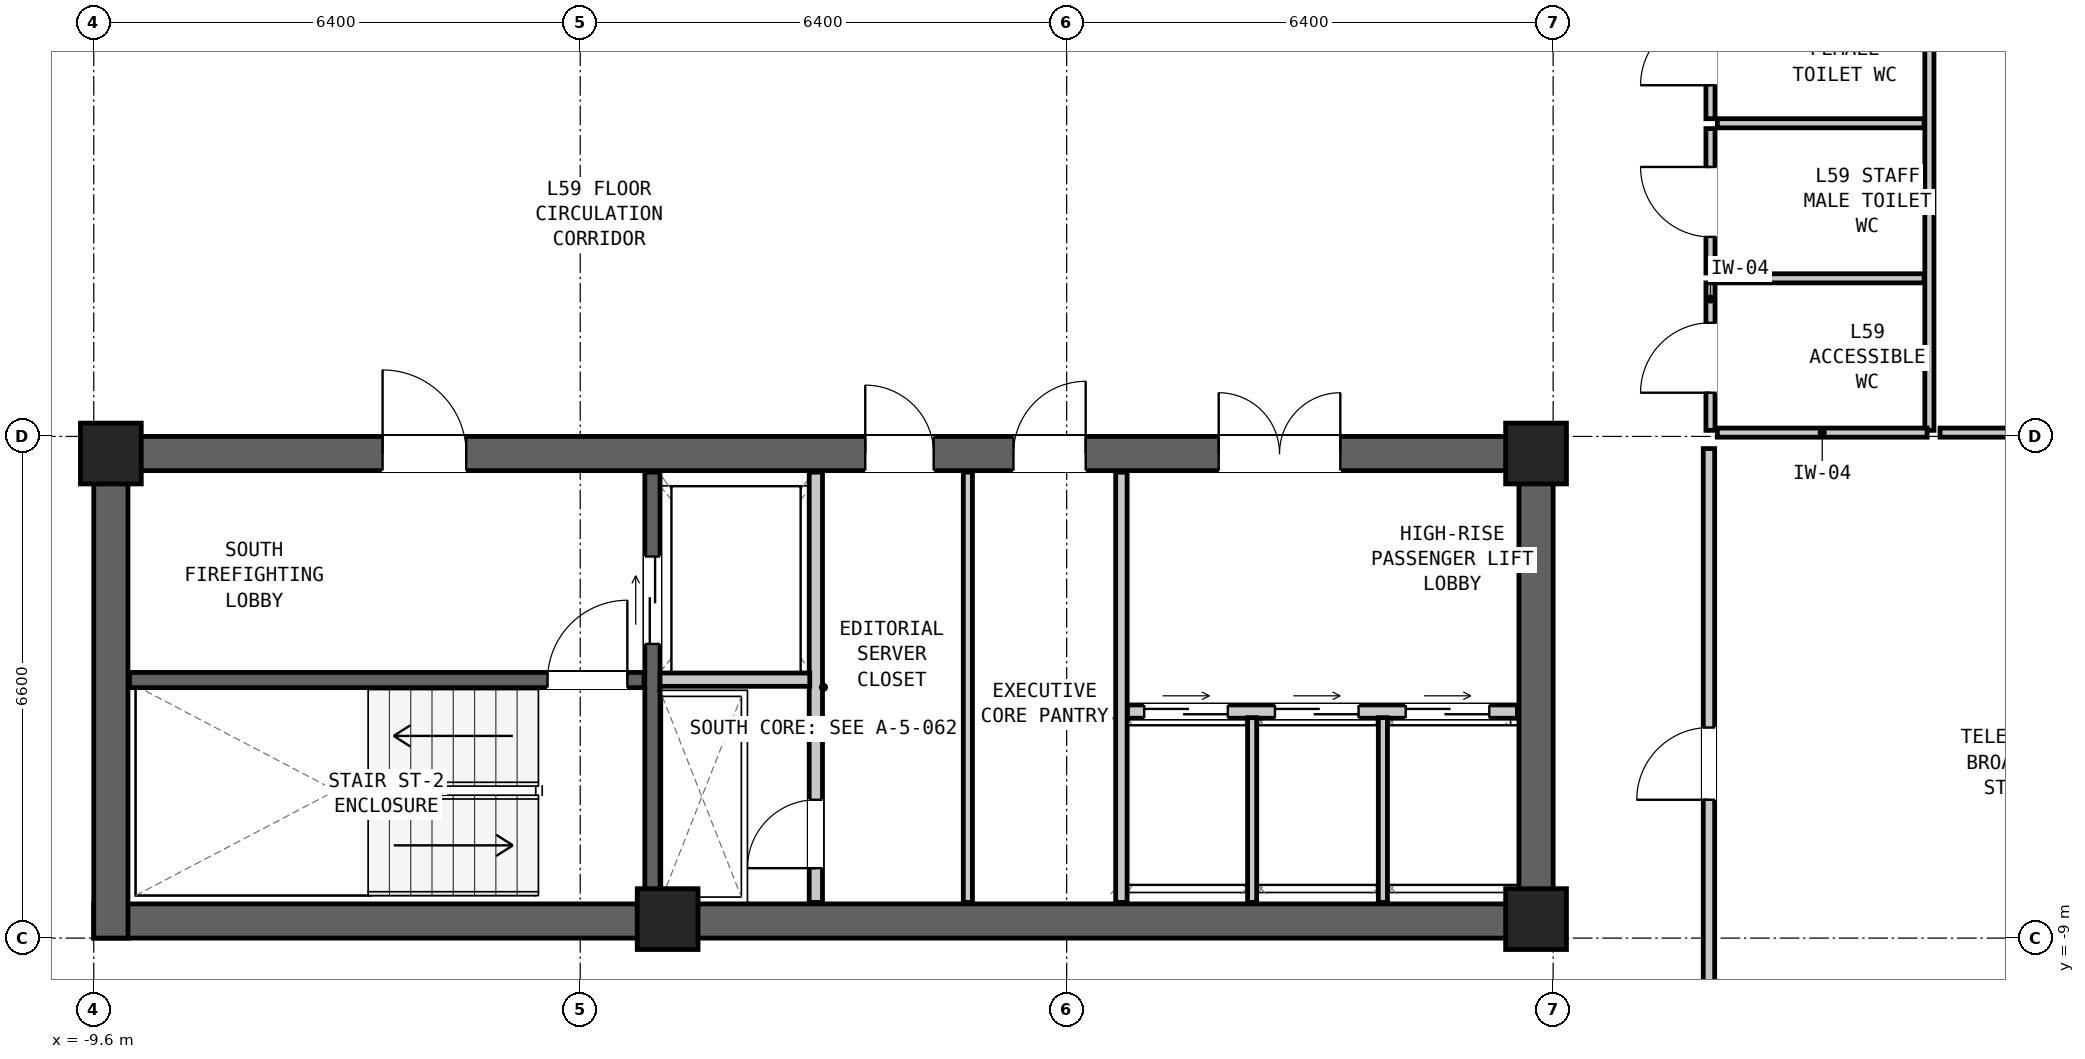
"""IFC4 building model, lengths in metres.
Left out: names, types, materials, properties, quantities, classifications, styles, units other than length and angle.
Written with IfcOpenShell. Run it as: python <this file> out.ifc"""

import sys

from ifc_helpers import new_model, si_unit, direction, frame, frame_2d, origin, origin_2d, place, context, subcontext, project, spatial, rectangle, extrude, element, fill, save


model = new_model("IFC4")
c1 = context("Model", 3, precision=1e-05, world=origin(), true_north=direction((0.0, 1.0)))
c2 = subcontext(c1, "Body", "Model", "MODEL_VIEW")
j1 = project(units=[si_unit("LENGTHUNIT", "METRE"), si_unit("PLANEANGLEUNIT", "RADIAN")], contexts=[c1])
p1 = place(None, origin())
s1 = spatial("IfcSite", under=j1, at=p1, CompositionType="ELEMENT")
p2 = place(p1, origin())
s2 = spatial("IfcBuilding", under=s1, at=p2, CompositionType="ELEMENT")
p3 = place(p2, frame((0.0, 0.0, 202.55)))
s3 = spatial("IfcBuildingStorey", under=s2, at=p3, CompositionType="ELEMENT", Elevation=202.55)
p4 = place(p3, frame((-9.6, -8.775, 0.0), z_axis=(0.0, 0.0, 1.0), x_axis=(1.0, 0.0, 0.0)))
e1 = element("IfcWall", 1, at=p4, inside=s3, PredefinedType="SHEAR", context=c2, shape_type="SweptSolid", body=[
    extrude(rectangle(XDim=19.2, YDim=0.45, at=frame_2d((9.6, 0.0))), origin(), (0.0, 0.0, 1.0), 3.05),
])
p5 = place(p3, frame((-9.6, -2.625, 0.0), z_axis=(0.0, 0.0, 1.0), x_axis=(1.0, 0.0, 0.0)))
e2 = element("IfcWall", 2, at=p5, inside=s3, PredefinedType="SHEAR", context=c2, shape_type="SweptSolid", body=[
    extrude(rectangle(XDim=19.2, YDim=0.45, at=frame_2d((9.6, 0.0))), origin(), (0.0, 0.0, 1.0), 3.05),
])
p6 = place(p5, frame((3.8, 0.0, 0.0)))
e3 = element("IfcOpeningElement", 3, at=p6, cuts=e2, PredefinedType="OPENING", context=c2, shape_type="SweptSolid", body=[
    extrude(rectangle(XDim=1.1, YDim=2.08, at=frame_2d((0.55, 1.04))), frame((0.0, 0.237, 0.0), z_axis=(0.0, -1.0, 0.0), x_axis=(1.0, 0.0, 0.0)), (0.0, 0.0, 1.0), 0.474),
])
p7 = place(p5, frame((10.15, 0.0, 0.0)))
e4 = element("IfcOpeningElement", 4, at=p7, cuts=e2, PredefinedType="OPENING", context=c2, shape_type="SweptSolid", body=[
    extrude(rectangle(XDim=0.9, YDim=2.05, at=frame_2d((0.45, 1.025))), frame((0.0, 0.237, 0.0), z_axis=(0.0, -1.0, 0.0), x_axis=(1.0, 0.0, 0.0)), (0.0, 0.0, 1.0), 0.474),
])
p8 = place(p5, frame((12.1, 0.0, 0.0)))
e5 = element("IfcOpeningElement", 5, at=p8, cuts=e2, PredefinedType="OPENING", context=c2, shape_type="SweptSolid", body=[
    extrude(rectangle(XDim=0.95, YDim=2.1, at=frame_2d((0.475, 1.05))), frame((0.0, 0.237, 0.0), z_axis=(0.0, -1.0, 0.0), x_axis=(1.0, 0.0, 0.0)), (0.0, 0.0, 1.0), 0.474),
])
p9 = place(p5, frame((14.8, 0.0, 0.0)))
e6 = element("IfcOpeningElement", 6, at=p9, cuts=e2, PredefinedType="OPENING", context=c2, shape_type="SweptSolid", body=[
    extrude(rectangle(XDim=1.6, YDim=2.12, at=frame_2d((0.8, 1.06))), frame((0.0, 0.237, 0.0), z_axis=(0.0, -1.0, 0.0), x_axis=(1.0, 0.0, 0.0)), (0.0, 0.0, 1.0), 0.474),
])
for number, where, z_axis, x_axis in (
    (7, (-9.375, -9.0, 0.0), (0.0, 0.0, 1.0), (0.0, 1.0, 0.0)),
    (8, (9.375, -9.0, 0.0), (0.0, 0.0, 1.0), (0.0, 1.0, 0.0)),
):
    element("IfcWall", number, at=place(p3, frame(where, z_axis=z_axis, x_axis=x_axis)), inside=s3, PredefinedType="SHEAR", context=c2, shape_type="SweptSolid", body=[
        extrude(rectangle(XDim=6.6, YDim=0.45, at=frame_2d((3.3, 0.0))), origin(), (0.0, 0.0, 1.0), 3.05),
    ])
for number, where, z_axis, x_axis in (
    (9, (-9.375, -2.625, 0.0), (0.0, 0.0, 1.0), (1.0, 0.0, 0.0)),
    (10, (9.375, -2.625, 0.0), (0.0, 0.0, 1.0), (1.0, 0.0, 0.0)),
    (11, (-2.05, -8.75, 0.0), (0.0, 0.0, 1.0), (1.0, 0.0, 0.0)),
    (12, (9.375, -8.75, 0.0), (0.0, 0.0, 1.0), (1.0, 0.0, 0.0)),
):
    element("IfcColumn", number, at=place(p3, frame(where, z_axis=z_axis, x_axis=x_axis)), inside=s3, PredefinedType="COLUMN", context=c2, shape_type="SweptSolid", body=[
        extrude(rectangle(XDim=0.8, YDim=0.8, at=origin_2d()), origin(), (0.0, 0.0, 1.0), 3.05),
    ])
p10 = place(p3, frame((-9.13, -5.605, 0.0), z_axis=(0.0, 0.0, 1.0), x_axis=(1.0, 0.0, 0.0)))
e13 = element("IfcWall", 13, at=p10, inside=s3, PredefinedType="SHEAR", context=c2, shape_type="SweptSolid", body=[
    extrude(rectangle(XDim=6.77, YDim=0.2, at=frame_2d((3.385, 0.0))), origin(), (0.0, 0.0, 1.0), 2.86),
])
p11 = place(p10, frame((5.5, 0.0, 0.0)))
e14 = element("IfcOpeningElement", 14, at=p11, cuts=e13, PredefinedType="OPENING", context=c2, shape_type="SweptSolid", body=[
    extrude(rectangle(XDim=1.05, YDim=2.08, at=frame_2d((0.525, 1.04))), frame((0.0, 0.112, 0.0), z_axis=(0.0, -1.0, 0.0), x_axis=(1.0, 0.0, 0.0)), (0.0, 0.0, 1.0), 0.224),
])
p12 = place(p3, frame((-2.25, -8.53, 0.0), z_axis=(0.0, 0.0, 1.0), x_axis=(0.0, 1.0, 0.0)))
e15 = element("IfcWall", 15, at=p12, inside=s3, PredefinedType="SHEAR", context=c2, shape_type="SweptSolid", body=[
    extrude(rectangle(XDim=5.66, YDim=0.2, at=frame_2d((2.83, 0.0))), origin(), (0.0, 0.0, 1.0), 2.86),
])
p13 = place(p12, frame((3.4, 0.0, 0.0)))
e16 = element("IfcOpeningElement", 16, at=p13, cuts=e15, PredefinedType="OPENING", context=c2, shape_type="SweptSolid", body=[
    extrude(rectangle(XDim=1.15, YDim=2.08, at=frame_2d((0.575, 1.04))), frame((0.0, 0.112, 0.0), z_axis=(0.0, -1.0, 0.0), x_axis=(1.0, 0.0, 0.0)), (0.0, 0.0, 1.0), 0.224),
])
p14 = place(p3, frame((-0.1, -8.53, 0.0), z_axis=(0.0, 0.0, 1.0), x_axis=(0.0, 1.0, 0.0)))
e17 = element("IfcWall", 17, at=p14, inside=s3, PredefinedType="PARTITIONING", context=c2, shape_type="SweptSolid", body=[
    extrude(rectangle(XDim=5.66, YDim=0.175, at=frame_2d((2.83, 0.0))), origin(), (0.0, 0.0, 1.0), 2.86),
])
p15 = place(p14, frame((0.45, 0.0, 0.0)))
e18 = element("IfcOpeningElement", 18, at=p15, cuts=e17, PredefinedType="OPENING", context=c2, shape_type="SweptSolid", body=[
    extrude(rectangle(XDim=0.9, YDim=2.05, at=frame_2d((0.45, 1.025))), frame((0.0, 0.1, 0.0), z_axis=(0.0, -1.0, 0.0), x_axis=(1.0, 0.0, 0.0)), (0.0, 0.0, 1.0), 0.199),
])
p16 = place(p3, frame((-2.15, -5.6, 0.0), z_axis=(0.0, 0.0, 1.0), x_axis=(1.0, 0.0, 0.0)))
e19 = element("IfcWall", 19, at=p16, inside=s3, PredefinedType="PARTITIONING", context=c2, shape_type="SweptSolid", body=[
    extrude(rectangle(XDim=1.97, YDim=0.175, at=frame_2d((0.985, 0.0))), origin(), (0.0, 0.0, 1.0), 2.86),
])
p17 = place(p3, frame((3.92, -8.53, 0.0), z_axis=(0.0, 0.0, 1.0), x_axis=(0.0, 1.0, 0.0)))
e20 = element("IfcWall", 20, at=p17, inside=s3, PredefinedType="PARTITIONING", context=c2, shape_type="SweptSolid", body=[
    extrude(rectangle(XDim=5.66, YDim=0.15, at=frame_2d((2.83, 0.0))), origin(), (0.0, 0.0, 1.0), 2.86),
])
p18 = place(p3, frame((1.9, -8.53, 0.0), z_axis=(0.0, 0.0, 1.0), x_axis=(0.0, 1.0, 0.0)))
e21 = element("IfcWall", 21, at=p18, inside=s3, PredefinedType="PARTITIONING", context=c2, shape_type="SweptSolid", body=[
    extrude(rectangle(XDim=5.66, YDim=0.12, at=frame_2d((2.83, 0.0))), origin(), (0.0, 0.0, 1.0), 2.86),
])
p19 = place(p3, frame((4.0, -6.02, 0.0), z_axis=(0.0, 0.0, 1.0), x_axis=(1.0, 0.0, 0.0)))
e22 = element("IfcWall", 22, at=p19, inside=s3, PredefinedType="PARTITIONING", context=c2, shape_type="SweptSolid", body=[
    extrude(rectangle(XDim=5.13, YDim=0.175, at=frame_2d((2.565, 0.0))), origin(), (0.0, 0.0, 1.0), 2.86),
])
p20 = place(p19, frame((0.22, 0.0, 0.0)))
e23 = element("IfcOpeningElement", 23, at=p20, cuts=e22, PredefinedType="OPENING", context=c2, shape_type="SweptSolid", body=[
    extrude(rectangle(XDim=1.1, YDim=2.06, at=frame_2d((0.55, 1.03))), frame((0.0, 0.1, 0.0), z_axis=(0.0, -1.0, 0.0), x_axis=(1.0, 0.0, 0.0)), (0.0, 0.0, 1.0), 0.199),
])
p21 = place(p19, frame((1.94, 0.0, 0.0)))
e24 = element("IfcOpeningElement", 24, at=p21, cuts=e22, PredefinedType="OPENING", context=c2, shape_type="SweptSolid", body=[
    extrude(rectangle(XDim=1.1, YDim=2.06, at=frame_2d((0.55, 1.03))), frame((0.0, 0.1, 0.0), z_axis=(0.0, -1.0, 0.0), x_axis=(1.0, 0.0, 0.0)), (0.0, 0.0, 1.0), 0.199),
])
p22 = place(p19, frame((3.66, 0.0, 0.0)))
e25 = element("IfcOpeningElement", 25, at=p22, cuts=e22, PredefinedType="OPENING", context=c2, shape_type="SweptSolid", body=[
    extrude(rectangle(XDim=1.1, YDim=2.06, at=frame_2d((0.55, 1.03))), frame((0.0, 0.1, 0.0), z_axis=(0.0, -1.0, 0.0), x_axis=(1.0, 0.0, 0.0)), (0.0, 0.0, 1.0), 0.199),
])
for number, where, z_axis, x_axis in (
    (26, (5.64, -8.53, 0.0), (0.0, 0.0, 1.0), (0.0, 1.0, 0.0)),
    (27, (7.36, -8.53, 0.0), (0.0, 0.0, 1.0), (0.0, 1.0, 0.0)),
):
    element("IfcWall", number, at=place(p3, frame(where, z_axis=z_axis, x_axis=x_axis)), inside=s3, PredefinedType="PARTITIONING", context=c2, shape_type="SweptSolid", body=[
        extrude(rectangle(XDim=2.43, YDim=0.12, at=frame_2d((1.215, 0.0))), origin(), (0.0, 0.0, 1.0), 2.86),
    ])
p23 = place(p3, frame((11.67, -2.32, 0.0), z_axis=(0.0, 0.0, 1.0), x_axis=(0.0, 1.0, 0.0)))
e28 = element("IfcWall", 28, at=p23, inside=s3, PredefinedType="PARTITIONING", context=c2, shape_type="SweptSolid", body=[
    extrude(rectangle(XDim=1.94, YDim=0.12, at=frame_2d((0.97, 0.0))), origin(), (0.0, 0.0, 1.0), 2.86),
])
p24 = place(p23, frame((0.495, 0.0, 0.0)))
e29 = element("IfcOpeningElement", 29, at=p24, cuts=e28, PredefinedType="OPENING", context=c2, shape_type="SweptSolid", body=[
    extrude(rectangle(XDim=0.92, YDim=2.1, at=frame_2d((0.46, 1.05))), frame((0.0, 0.072, 0.0), z_axis=(0.0, -1.0, 0.0), x_axis=(1.0, 0.0, 0.0)), (0.0, 0.0, 1.0), 0.144),
])
p25 = place(p3, frame((11.67, -0.25, 0.0), z_axis=(0.0, 0.0, 1.0), x_axis=(0.0, 1.0, 0.0)))
e30 = element("IfcWall", 30, at=p25, inside=s3, PredefinedType="PARTITIONING", context=c2, shape_type="SweptSolid", body=[
    extrude(rectangle(XDim=1.9, YDim=0.12, at=frame_2d((0.95, 0.0))), origin(), (0.0, 0.0, 1.0), 2.86),
])
p26 = place(p25, frame((0.475, 0.0, 0.0)))
e31 = element("IfcOpeningElement", 31, at=p26, cuts=e30, PredefinedType="OPENING", context=c2, shape_type="SweptSolid", body=[
    extrude(rectangle(XDim=0.92, YDim=2.1, at=frame_2d((0.46, 1.05))), frame((0.0, 0.072, 0.0), z_axis=(0.0, -1.0, 0.0), x_axis=(1.0, 0.0, 0.0)), (0.0, 0.0, 1.0), 0.144),
])
p27 = place(p3, frame((11.67, 1.78, 0.0), z_axis=(0.0, 0.0, 1.0), x_axis=(0.0, 1.0, 0.0)))
e32 = element("IfcWall", 32, at=p27, inside=s3, PredefinedType="PARTITIONING", context=c2, shape_type="SweptSolid", body=[
    extrude(rectangle(XDim=1.83, YDim=0.12, at=frame_2d((0.915, 0.0))), origin(), (0.0, 0.0, 1.0), 2.86),
])
p28 = place(p27, frame((0.44, 0.0, 0.0)))
e33 = element("IfcOpeningElement", 33, at=p28, cuts=e32, PredefinedType="OPENING", context=c2, shape_type="SweptSolid", body=[
    extrude(rectangle(XDim=0.92, YDim=2.1, at=frame_2d((0.46, 1.05))), frame((0.0, 0.072, 0.0), z_axis=(0.0, -1.0, 0.0), x_axis=(1.0, 0.0, 0.0)), (0.0, 0.0, 1.0), 0.144),
])
p29 = place(p3, frame((14.55, -2.32, 0.0), z_axis=(0.0, 0.0, 1.0), x_axis=(0.0, 1.0, 0.0)))
e34 = element("IfcWall", 34, at=p29, inside=s3, PredefinedType="PARTITIONING", context=c2, shape_type="SweptSolid", body=[
    extrude(rectangle(XDim=5.93, YDim=0.12, at=frame_2d((2.965, 0.0))), origin(), (0.0, 0.0, 1.0), 2.86),
])
p30 = place(p3, frame((11.76, -2.35, 0.0), z_axis=(0.0, 0.0, 1.0), x_axis=(1.0, 0.0, 0.0)))
e35 = element("IfcWall", 35, at=p30, inside=s3, PredefinedType="PARTITIONING", context=c2, shape_type="SweptSolid", body=[
    extrude(rectangle(XDim=2.76, YDim=0.12, at=frame_2d((1.38, 0.0))), origin(), (0.0, 0.0, 1.0), 1.981),
])
for number, where, z_axis, x_axis in (
    (36, (11.76, -0.32, 0.0), (0.0, 0.0, 1.0), (1.0, 0.0, 0.0)),
    (37, (11.76, 1.72, 0.0), (0.0, 0.0, 1.0), (1.0, 0.0, 0.0)),
):
    element("IfcWall", number, at=place(p3, frame(where, z_axis=z_axis, x_axis=x_axis)), inside=s3, PredefinedType="PARTITIONING", context=c2, shape_type="SweptSolid", body=[
        extrude(rectangle(XDim=2.72, YDim=0.12, at=frame_2d((1.36, 0.0))), origin(), (0.0, 0.0, 1.0), 2.86),
    ])
p31 = place(p3, frame((14.69, -2.35, 0.0), z_axis=(0.0, 0.0, 1.0), x_axis=(1.0, 0.0, 0.0)))
e38 = element("IfcWall", 38, at=p31, inside=s3, PredefinedType="PARTITIONING", context=c2, shape_type="SweptSolid", body=[
    extrude(rectangle(XDim=4.69, YDim=0.12, at=frame_2d((2.345, 0.0))), origin(), (0.0, 0.0, 1.0), 1.981),
])
p32 = place(p3, frame((11.65, -10.85, 0.0), z_axis=(0.0, 0.0, 1.0), x_axis=(0.0, 1.0, 0.0)))
e39 = element("IfcWall", 39, at=p32, inside=s3, PredefinedType="PARTITIONING", context=c2, shape_type="SweptSolid", body=[
    extrude(rectangle(XDim=8.29, YDim=0.15, at=frame_2d((4.145, 0.0))), origin(), (0.0, 0.0, 1.0), 2.86),
])
p33 = place(p32, frame((3.67, 0.0, 0.0)))
e40 = element("IfcOpeningElement", 40, at=p33, cuts=e39, PredefinedType="OPENING", context=c2, shape_type="SweptSolid", body=[
    extrude(rectangle(XDim=0.95, YDim=2.1, at=frame_2d((0.475, 1.05))), frame((0.0, 0.087, 0.0), z_axis=(0.0, -1.0, 0.0), x_axis=(1.0, 0.0, 0.0)), (0.0, 0.0, 1.0), 0.174),
])
p34 = place(p11, origin())
e41 = element("IfcDoor", 41, at=p34, inside=s3, OperationType="SINGLE_SWING_RIGHT", PredefinedType="DOOR", context=c2, shape_type="SweptSolid", body=[
    extrude(rectangle(XDim=1.05, YDim=2.08, at=frame_2d((0.525, 1.04))), frame((0.0, 0.025, 0.0), z_axis=(0.0, -1.0, 0.0), x_axis=(1.0, 0.0, 0.0)), (0.0, 0.0, 1.0), 0.05),
])
fill(e14, e41)
p35 = place(p6, origin())
e42 = element("IfcDoor", 42, at=p35, inside=s3, OperationType="SINGLE_SWING_LEFT", PredefinedType="DOOR", context=c2, shape_type="SweptSolid", body=[
    extrude(rectangle(XDim=1.1, YDim=2.08, at=frame_2d((0.55, 1.04))), frame((0.0, 0.025, 0.0), z_axis=(0.0, -1.0, 0.0), x_axis=(1.0, 0.0, 0.0)), (0.0, 0.0, 1.0), 0.05),
])
fill(e3, e42)
p36 = place(p13, origin())
e43 = element("IfcDoor", 43, at=p36, inside=s3, OperationType="DOUBLE_DOOR_SLIDING", PredefinedType="DOOR", context=c2, shape_type="SweptSolid", body=[
    extrude(rectangle(XDim=1.15, YDim=2.08, at=frame_2d((0.575, 1.04))), frame((0.0, 0.025, 0.0), z_axis=(0.0, -1.0, 0.0), x_axis=(1.0, 0.0, 0.0)), (0.0, 0.0, 1.0), 0.05),
])
fill(e16, e43)
p37 = place(p15, origin())
e44 = element("IfcDoor", 44, at=p37, inside=s3, OperationType="SINGLE_SWING_LEFT", PredefinedType="DOOR", context=c2, shape_type="SweptSolid", body=[
    extrude(rectangle(XDim=0.9, YDim=2.05, at=frame_2d((0.45, 1.025))), frame((0.0, 0.025, 0.0), z_axis=(0.0, -1.0, 0.0), x_axis=(1.0, 0.0, 0.0)), (0.0, 0.0, 1.0), 0.05),
])
fill(e18, e44)
p38 = place(p7, origin())
e45 = element("IfcDoor", 45, at=p38, inside=s3, OperationType="SINGLE_SWING_LEFT", PredefinedType="DOOR", context=c2, shape_type="SweptSolid", body=[
    extrude(rectangle(XDim=0.9, YDim=2.05, at=frame_2d((0.45, 1.025))), frame((0.0, 0.025, 0.0), z_axis=(0.0, -1.0, 0.0), x_axis=(1.0, 0.0, 0.0)), (0.0, 0.0, 1.0), 0.05),
])
fill(e4, e45)
p39 = place(p8, origin())
e46 = element("IfcDoor", 46, at=p39, inside=s3, OperationType="SINGLE_SWING_RIGHT", PredefinedType="DOOR", context=c2, shape_type="SweptSolid", body=[
    extrude(rectangle(XDim=0.95, YDim=2.1, at=frame_2d((0.475, 1.05))), frame((0.0, 0.025, 0.0), z_axis=(0.0, -1.0, 0.0), x_axis=(1.0, 0.0, 0.0)), (0.0, 0.0, 1.0), 0.05),
])
fill(e5, e46)
p40 = place(p20, origin())
e47 = element("IfcDoor", 47, at=p40, inside=s3, OperationType="DOUBLE_DOOR_SLIDING", PredefinedType="DOOR", context=c2, shape_type="SweptSolid", body=[
    extrude(rectangle(XDim=1.1, YDim=2.06, at=frame_2d((0.55, 1.03))), frame((0.0, 0.025, 0.0), z_axis=(0.0, -1.0, 0.0), x_axis=(1.0, 0.0, 0.0)), (0.0, 0.0, 1.0), 0.05),
])
fill(e23, e47)
p41 = place(p21, origin())
e48 = element("IfcDoor", 48, at=p41, inside=s3, OperationType="DOUBLE_DOOR_SLIDING", PredefinedType="DOOR", context=c2, shape_type="SweptSolid", body=[
    extrude(rectangle(XDim=1.1, YDim=2.06, at=frame_2d((0.55, 1.03))), frame((0.0, 0.025, 0.0), z_axis=(0.0, -1.0, 0.0), x_axis=(1.0, 0.0, 0.0)), (0.0, 0.0, 1.0), 0.05),
])
fill(e24, e48)
p42 = place(p22, origin())
e49 = element("IfcDoor", 49, at=p42, inside=s3, OperationType="DOUBLE_DOOR_SLIDING", PredefinedType="DOOR", context=c2, shape_type="SweptSolid", body=[
    extrude(rectangle(XDim=1.1, YDim=2.06, at=frame_2d((0.55, 1.03))), frame((0.0, 0.025, 0.0), z_axis=(0.0, -1.0, 0.0), x_axis=(1.0, 0.0, 0.0)), (0.0, 0.0, 1.0), 0.05),
])
fill(e25, e49)
p43 = place(p9, origin())
e50 = element("IfcDoor", 50, at=p43, inside=s3, OperationType="DOUBLE_DOOR_SINGLE_SWING", PredefinedType="DOOR", context=c2, shape_type="SweptSolid", body=[
    extrude(rectangle(XDim=1.6, YDim=2.12, at=frame_2d((0.8, 1.06))), frame((0.0, 0.025, 0.0), z_axis=(0.0, -1.0, 0.0), x_axis=(1.0, 0.0, 0.0)), (0.0, 0.0, 1.0), 0.05),
])
fill(e6, e50)
p44 = place(p24, origin())
e51 = element("IfcDoor", 51, at=p44, inside=s3, OperationType="SINGLE_SWING_LEFT", PredefinedType="DOOR", context=c2, shape_type="SweptSolid", body=[
    extrude(rectangle(XDim=0.92, YDim=2.1, at=frame_2d((0.46, 1.05))), frame((0.0, 0.025, 0.0), z_axis=(0.0, -1.0, 0.0), x_axis=(1.0, 0.0, 0.0)), (0.0, 0.0, 1.0), 0.05),
])
fill(e29, e51)
p45 = place(p26, origin())
e52 = element("IfcDoor", 52, at=p45, inside=s3, OperationType="SINGLE_SWING_RIGHT", PredefinedType="DOOR", context=c2, shape_type="SweptSolid", body=[
    extrude(rectangle(XDim=0.92, YDim=2.1, at=frame_2d((0.46, 1.05))), frame((0.0, 0.025, 0.0), z_axis=(0.0, -1.0, 0.0), x_axis=(1.0, 0.0, 0.0)), (0.0, 0.0, 1.0), 0.05),
])
fill(e31, e52)
p46 = place(p28, origin())
e53 = element("IfcDoor", 53, at=p46, inside=s3, OperationType="SINGLE_SWING_LEFT", PredefinedType="DOOR", context=c2, shape_type="SweptSolid", body=[
    extrude(rectangle(XDim=0.92, YDim=2.1, at=frame_2d((0.46, 1.05))), frame((0.0, 0.025, 0.0), z_axis=(0.0, -1.0, 0.0), x_axis=(1.0, 0.0, 0.0)), (0.0, 0.0, 1.0), 0.05),
])
fill(e33, e53)
p47 = place(p33, origin())
e54 = element("IfcDoor", 54, at=p47, inside=s3, OperationType="SINGLE_SWING_LEFT", PredefinedType="DOOR", context=c2, shape_type="SweptSolid", body=[
    extrude(rectangle(XDim=0.95, YDim=2.1, at=frame_2d((0.475, 1.05))), frame((0.0, 0.025, 0.0), z_axis=(0.0, -1.0, 0.0), x_axis=(1.0, 0.0, 0.0)), (0.0, 0.0, 1.0), 0.05),
])
fill(e40, e54)
save(model, sys.argv[1])
